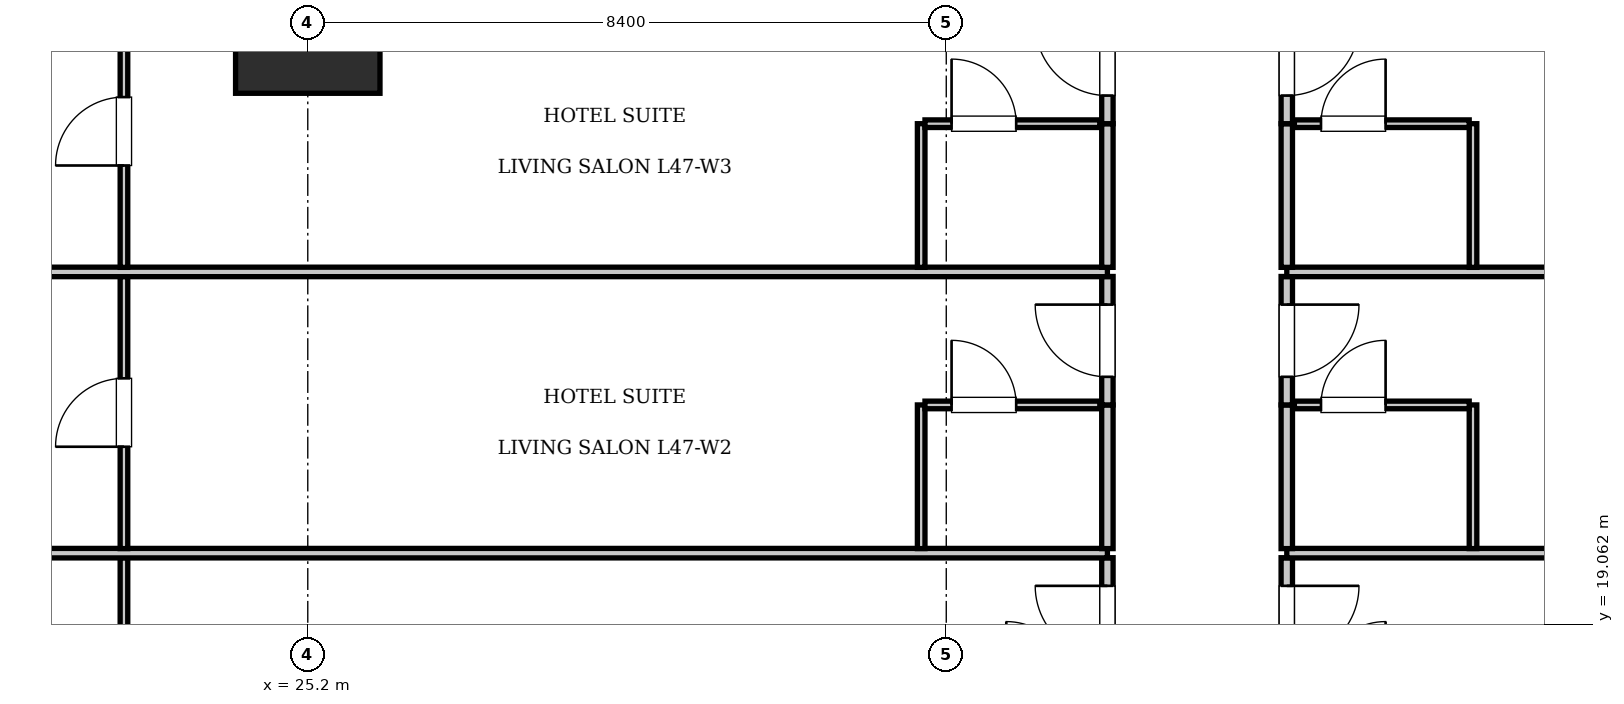
"""IFC4 building model, lengths in metres.
Left out: names, types, materials, properties, quantities, classifications, styles, units other than length and angle.
Written with IfcOpenShell. Run it as: python <this file> out.ifc"""

import sys

from ifc_helpers import new_model, si_unit, direction, frame, frame_2d, origin, origin_2d, place, context, subcontext, project, spatial, rectangle, extrude, element, fill, save


model = new_model("IFC4")
c1 = context("Model", 3, precision=1e-05, world=origin(), true_north=direction((0.0, 1.0)))
c2 = subcontext(c1, "Body", "Model", "MODEL_VIEW")
j1 = project(units=[si_unit("LENGTHUNIT", "METRE"), si_unit("PLANEANGLEUNIT", "RADIAN")], contexts=[c1])
p1 = place(None, origin())
s1 = spatial("IfcSite", under=j1, at=p1, CompositionType="ELEMENT")
p2 = place(p1, origin())
s2 = spatial("IfcBuilding", under=s1, at=p2, CompositionType="ELEMENT")
p3 = place(p2, frame((0.0, 0.0, 192.85)))
s3 = spatial("IfcBuildingStorey", under=s2, at=p3, CompositionType="ELEMENT", Elevation=192.85)
p4 = place(p3, frame((25.2, 27.0, 0.0), z_axis=(0.0, 0.0, 1.0), x_axis=(1.0, 0.0, 0.0)))
e1 = element("IfcColumn", 1, at=p4, inside=s3, PredefinedType="COLUMN", context=c2, shape_type="SweptSolid", body=[
    extrude(rectangle(XDim=1.9, YDim=1.9, at=origin_2d()), origin(), (0.0, 0.0, 1.0), 3.85),
])
p5 = place(p3, frame((35.72, 18.25, 0.0), z_axis=(0.0, 0.0, 1.0), x_axis=(0.0, 1.0, 0.0)))
e2 = element("IfcWall", 2, at=p5, inside=s3, PredefinedType="PARTITIONING", context=c2, shape_type="SweptSolid", body=[
    extrude(rectangle(XDim=1.69, YDim=0.15, at=frame_2d((0.845, 0.0))), origin(), (0.0, 0.0, 1.0), 3.61),
])
p6 = place(p5, frame((0.37, 0.0, 0.0)))
e3 = element("IfcOpeningElement", 3, at=p6, cuts=e2, PredefinedType="OPENING", context=c2, shape_type="SweptSolid", body=[
    extrude(rectangle(XDim=0.95, YDim=2.15, at=frame_2d((0.475, 1.075))), frame((0.0, 0.085, 0.0), z_axis=(0.0, -1.0, 0.0), x_axis=(1.0, 0.0, 0.0)), (0.0, 0.0, 1.0), 0.17),
])
p7 = place(p3, frame((22.781, 16.36, 0.0), z_axis=(0.0, 0.0, 1.0), x_axis=(0.0, 1.0, 0.0)))
e4 = element("IfcWall", 4, at=p7, inside=s3, PredefinedType="PARTITIONING", context=c2, shape_type="SweptSolid", body=[
    extrude(rectangle(XDim=3.58, YDim=0.1, at=frame_2d((1.79, 0.0))), origin(), (0.0, 0.0, 1.0), 3.61),
])
p8 = place(p7, frame((1.34, 0.0, 0.0)))
e5 = element("IfcOpeningElement", 5, at=p8, cuts=e4, PredefinedType="OPENING", context=c2, shape_type="SweptSolid", body=[
    extrude(rectangle(XDim=0.9, YDim=2.1, at=frame_2d((0.45, 1.05))), frame((0.0, 0.06, 0.0), z_axis=(0.0, -1.0, 0.0), x_axis=(1.0, 0.0, 0.0)), (0.0, 0.0, 1.0), 0.12),
])
p9 = place(p3, frame((38.08, 18.25, 0.0), z_axis=(0.0, 0.0, 1.0), x_axis=(0.0, 1.0, 0.0)))
e6 = element("IfcWall", 6, at=p9, inside=s3, PredefinedType="PARTITIONING", context=c2, shape_type="SweptSolid", body=[
    extrude(rectangle(XDim=1.69, YDim=0.15, at=frame_2d((0.845, 0.0))), origin(), (0.0, 0.0, 1.0), 3.61),
])
p10 = place(p9, frame((0.37, 0.0, 0.0)))
e7 = element("IfcOpeningElement", 7, at=p10, cuts=e6, PredefinedType="OPENING", context=c2, shape_type="SweptSolid", body=[
    extrude(rectangle(XDim=0.95, YDim=2.15, at=frame_2d((0.475, 1.075))), frame((0.0, 0.085, 0.0), z_axis=(0.0, -1.0, 0.0), x_axis=(1.0, 0.0, 0.0)), (0.0, 0.0, 1.0), 0.17),
])
p11 = place(p3, frame((13.2, 20.0, 0.0), z_axis=(0.0, 0.0, 1.0), x_axis=(1.0, 0.0, 0.0)))
e8 = element("IfcWall", 8, at=p11, inside=s3, PredefinedType="PARTITIONING", context=c2, shape_type="SweptSolid", body=[
    extrude(rectangle(XDim=22.52, YDim=0.125, at=frame_2d((11.26, 0.0))), origin(), (0.0, 0.0, 1.0), 3.61),
])
p12 = place(p3, frame((38.08, 20.0, 0.0), z_axis=(0.0, 0.0, 1.0), x_axis=(1.0, 0.0, 0.0)))
e9 = element("IfcWall", 9, at=p12, inside=s3, PredefinedType="PARTITIONING", context=c2, shape_type="SweptSolid", body=[
    extrude(rectangle(XDim=24.32, YDim=0.125, at=frame_2d((12.16, 0.0))), origin(), (0.0, 0.0, 1.0), 3.61),
])
p13 = place(p3, frame((35.72, 20.06, 0.0), z_axis=(0.0, 0.0, 1.0), x_axis=(0.0, 1.0, 0.0)))
e10 = element("IfcWall", 10, at=p13, inside=s3, PredefinedType="PARTITIONING", context=c2, shape_type="SweptSolid", body=[
    extrude(rectangle(XDim=1.89, YDim=0.15, at=frame_2d((0.945, 0.0))), origin(), (0.0, 0.0, 1.0), 3.61),
])
p14 = place(p3, frame((35.72, 21.95, 0.0), z_axis=(0.0, 0.0, 1.0), x_axis=(0.0, 1.0, 0.0)))
e11 = element("IfcWall", 11, at=p14, inside=s3, PredefinedType="PARTITIONING", context=c2, shape_type="SweptSolid", body=[
    extrude(rectangle(XDim=1.69, YDim=0.15, at=frame_2d((0.845, 0.0))), origin(), (0.0, 0.0, 1.0), 3.61),
])
p15 = place(p14, frame((0.37, 0.0, 0.0)))
e12 = element("IfcOpeningElement", 12, at=p15, cuts=e11, PredefinedType="OPENING", context=c2, shape_type="SweptSolid", body=[
    extrude(rectangle(XDim=0.95, YDim=2.15, at=frame_2d((0.475, 1.075))), frame((0.0, 0.085, 0.0), z_axis=(0.0, -1.0, 0.0), x_axis=(1.0, 0.0, 0.0)), (0.0, 0.0, 1.0), 0.17),
])
p16 = place(p3, frame((33.27, 20.06, 0.0), z_axis=(0.0, 0.0, 1.0), x_axis=(0.0, 1.0, 0.0)))
e13 = element("IfcWall", 13, at=p16, inside=s3, PredefinedType="PARTITIONING", context=c2, shape_type="SweptSolid", body=[
    extrude(rectangle(XDim=1.89, YDim=0.1, at=frame_2d((0.945, 0.0))), origin(), (0.0, 0.0, 1.0), 3.61),
])
p17 = place(p3, frame((33.32, 21.95, 0.0), z_axis=(0.0, 0.0, 1.0), x_axis=(1.0, 0.0, 0.0)))
e14 = element("IfcWall", 14, at=p17, inside=s3, PredefinedType="PARTITIONING", context=c2, shape_type="SweptSolid", body=[
    extrude(rectangle(XDim=2.3, YDim=0.1, at=frame_2d((1.15, 0.0))), origin(), (0.0, 0.0, 1.0), 3.61),
])
p18 = place(p17, frame((0.35, 0.0, 0.0)))
e15 = element("IfcOpeningElement", 15, at=p18, cuts=e14, PredefinedType="OPENING", context=c2, shape_type="SweptSolid", body=[
    extrude(rectangle(XDim=0.85, YDim=2.1, at=frame_2d((0.425, 1.05))), frame((0.0, 0.06, 0.0), z_axis=(0.0, -1.0, 0.0), x_axis=(1.0, 0.0, 0.0)), (0.0, 0.0, 1.0), 0.12),
])
p19 = place(p3, frame((22.781, 20.06, 0.0), z_axis=(0.0, 0.0, 1.0), x_axis=(0.0, 1.0, 0.0)))
e16 = element("IfcWall", 16, at=p19, inside=s3, PredefinedType="PARTITIONING", context=c2, shape_type="SweptSolid", body=[
    extrude(rectangle(XDim=3.58, YDim=0.1, at=frame_2d((1.79, 0.0))), origin(), (0.0, 0.0, 1.0), 3.61),
])
p20 = place(p19, frame((1.34, 0.0, 0.0)))
e17 = element("IfcOpeningElement", 17, at=p20, cuts=e16, PredefinedType="OPENING", context=c2, shape_type="SweptSolid", body=[
    extrude(rectangle(XDim=0.9, YDim=2.1, at=frame_2d((0.45, 1.05))), frame((0.0, 0.06, 0.0), z_axis=(0.0, -1.0, 0.0), x_axis=(1.0, 0.0, 0.0)), (0.0, 0.0, 1.0), 0.12),
])
p21 = place(p3, frame((38.08, 20.06, 0.0), z_axis=(0.0, 0.0, 1.0), x_axis=(0.0, 1.0, 0.0)))
e18 = element("IfcWall", 18, at=p21, inside=s3, PredefinedType="PARTITIONING", context=c2, shape_type="SweptSolid", body=[
    extrude(rectangle(XDim=1.89, YDim=0.15, at=frame_2d((0.945, 0.0))), origin(), (0.0, 0.0, 1.0), 3.61),
])
p22 = place(p3, frame((38.08, 21.95, 0.0), z_axis=(0.0, 0.0, 1.0), x_axis=(0.0, 1.0, 0.0)))
e19 = element("IfcWall", 19, at=p22, inside=s3, PredefinedType="PARTITIONING", context=c2, shape_type="SweptSolid", body=[
    extrude(rectangle(XDim=1.69, YDim=0.15, at=frame_2d((0.845, 0.0))), origin(), (0.0, 0.0, 1.0), 3.61),
])
p23 = place(p22, frame((0.37, 0.0, 0.0)))
e20 = element("IfcOpeningElement", 20, at=p23, cuts=e19, PredefinedType="OPENING", context=c2, shape_type="SweptSolid", body=[
    extrude(rectangle(XDim=0.95, YDim=2.15, at=frame_2d((0.475, 1.075))), frame((0.0, 0.085, 0.0), z_axis=(0.0, -1.0, 0.0), x_axis=(1.0, 0.0, 0.0)), (0.0, 0.0, 1.0), 0.17),
])
p24 = place(p3, frame((40.53, 20.06, 0.0), z_axis=(0.0, 0.0, 1.0), x_axis=(0.0, 1.0, 0.0)))
e21 = element("IfcWall", 21, at=p24, inside=s3, PredefinedType="PARTITIONING", context=c2, shape_type="SweptSolid", body=[
    extrude(rectangle(XDim=1.89, YDim=0.1, at=frame_2d((0.945, 0.0))), origin(), (0.0, 0.0, 1.0), 3.61),
])
p25 = place(p3, frame((38.18, 21.95, 0.0), z_axis=(0.0, 0.0, 1.0), x_axis=(1.0, 0.0, 0.0)))
e22 = element("IfcWall", 22, at=p25, inside=s3, PredefinedType="PARTITIONING", context=c2, shape_type="SweptSolid", body=[
    extrude(rectangle(XDim=2.3, YDim=0.1, at=frame_2d((1.15, 0.0))), origin(), (0.0, 0.0, 1.0), 3.61),
])
p26 = place(p25, frame((0.35, 0.0, 0.0)))
e23 = element("IfcOpeningElement", 23, at=p26, cuts=e22, PredefinedType="OPENING", context=c2, shape_type="SweptSolid", body=[
    extrude(rectangle(XDim=0.85, YDim=2.1, at=frame_2d((0.425, 1.05))), frame((0.0, 0.06, 0.0), z_axis=(0.0, -1.0, 0.0), x_axis=(1.0, 0.0, 0.0)), (0.0, 0.0, 1.0), 0.12),
])
p27 = place(p3, frame((13.2, 23.7, 0.0), z_axis=(0.0, 0.0, 1.0), x_axis=(1.0, 0.0, 0.0)))
e24 = element("IfcWall", 24, at=p27, inside=s3, PredefinedType="PARTITIONING", context=c2, shape_type="SweptSolid", body=[
    extrude(rectangle(XDim=22.52, YDim=0.125, at=frame_2d((11.26, 0.0))), origin(), (0.0, 0.0, 1.0), 3.61),
])
p28 = place(p3, frame((38.08, 23.7, 0.0), z_axis=(0.0, 0.0, 1.0), x_axis=(1.0, 0.0, 0.0)))
e25 = element("IfcWall", 25, at=p28, inside=s3, PredefinedType="PARTITIONING", context=c2, shape_type="SweptSolid", body=[
    extrude(rectangle(XDim=24.32, YDim=0.125, at=frame_2d((12.16, 0.0))), origin(), (0.0, 0.0, 1.0), 3.61),
])
p29 = place(p3, frame((35.72, 23.76, 0.0), z_axis=(0.0, 0.0, 1.0), x_axis=(0.0, 1.0, 0.0)))
e26 = element("IfcWall", 26, at=p29, inside=s3, PredefinedType="PARTITIONING", context=c2, shape_type="SweptSolid", body=[
    extrude(rectangle(XDim=1.89, YDim=0.15, at=frame_2d((0.945, 0.0))), origin(), (0.0, 0.0, 1.0), 3.61),
])
p30 = place(p3, frame((35.72, 25.65, 0.0), z_axis=(0.0, 0.0, 1.0), x_axis=(0.0, 1.0, 0.0)))
e27 = element("IfcWall", 27, at=p30, inside=s3, PredefinedType="PARTITIONING", context=c2, shape_type="SweptSolid", body=[
    extrude(rectangle(XDim=1.69, YDim=0.15, at=frame_2d((0.845, 0.0))), origin(), (0.0, 0.0, 1.0), 3.61),
])
p31 = place(p30, frame((0.37, 0.0, 0.0)))
e28 = element("IfcOpeningElement", 28, at=p31, cuts=e27, PredefinedType="OPENING", context=c2, shape_type="SweptSolid", body=[
    extrude(rectangle(XDim=0.95, YDim=2.15, at=frame_2d((0.475, 1.075))), frame((0.0, 0.085, 0.0), z_axis=(0.0, -1.0, 0.0), x_axis=(1.0, 0.0, 0.0)), (0.0, 0.0, 1.0), 0.17),
])
p32 = place(p3, frame((33.27, 23.76, 0.0), z_axis=(0.0, 0.0, 1.0), x_axis=(0.0, 1.0, 0.0)))
e29 = element("IfcWall", 29, at=p32, inside=s3, PredefinedType="PARTITIONING", context=c2, shape_type="SweptSolid", body=[
    extrude(rectangle(XDim=1.89, YDim=0.1, at=frame_2d((0.945, 0.0))), origin(), (0.0, 0.0, 1.0), 3.61),
])
p33 = place(p3, frame((33.32, 25.65, 0.0), z_axis=(0.0, 0.0, 1.0), x_axis=(1.0, 0.0, 0.0)))
e30 = element("IfcWall", 30, at=p33, inside=s3, PredefinedType="PARTITIONING", context=c2, shape_type="SweptSolid", body=[
    extrude(rectangle(XDim=2.3, YDim=0.1, at=frame_2d((1.15, 0.0))), origin(), (0.0, 0.0, 1.0), 3.61),
])
p34 = place(p33, frame((0.35, 0.0, 0.0)))
e31 = element("IfcOpeningElement", 31, at=p34, cuts=e30, PredefinedType="OPENING", context=c2, shape_type="SweptSolid", body=[
    extrude(rectangle(XDim=0.85, YDim=2.1, at=frame_2d((0.425, 1.05))), frame((0.0, 0.06, 0.0), z_axis=(0.0, -1.0, 0.0), x_axis=(1.0, 0.0, 0.0)), (0.0, 0.0, 1.0), 0.12),
])
p35 = place(p3, frame((22.781, 23.76, 0.0), z_axis=(0.0, 0.0, 1.0), x_axis=(0.0, 1.0, 0.0)))
e32 = element("IfcWall", 32, at=p35, inside=s3, PredefinedType="PARTITIONING", context=c2, shape_type="SweptSolid", body=[
    extrude(rectangle(XDim=3.58, YDim=0.1, at=frame_2d((1.79, 0.0))), origin(), (0.0, 0.0, 1.0), 3.61),
])
p36 = place(p35, frame((1.34, 0.0, 0.0)))
e33 = element("IfcOpeningElement", 33, at=p36, cuts=e32, PredefinedType="OPENING", context=c2, shape_type="SweptSolid", body=[
    extrude(rectangle(XDim=0.9, YDim=2.1, at=frame_2d((0.45, 1.05))), frame((0.0, 0.06, 0.0), z_axis=(0.0, -1.0, 0.0), x_axis=(1.0, 0.0, 0.0)), (0.0, 0.0, 1.0), 0.12),
])
p37 = place(p3, frame((38.08, 23.76, 0.0), z_axis=(0.0, 0.0, 1.0), x_axis=(0.0, 1.0, 0.0)))
e34 = element("IfcWall", 34, at=p37, inside=s3, PredefinedType="PARTITIONING", context=c2, shape_type="SweptSolid", body=[
    extrude(rectangle(XDim=1.89, YDim=0.15, at=frame_2d((0.945, 0.0))), origin(), (0.0, 0.0, 1.0), 3.61),
])
p38 = place(p3, frame((38.08, 25.65, 0.0), z_axis=(0.0, 0.0, 1.0), x_axis=(0.0, 1.0, 0.0)))
e35 = element("IfcWall", 35, at=p38, inside=s3, PredefinedType="PARTITIONING", context=c2, shape_type="SweptSolid", body=[
    extrude(rectangle(XDim=1.69, YDim=0.15, at=frame_2d((0.845, 0.0))), origin(), (0.0, 0.0, 1.0), 3.61),
])
p39 = place(p38, frame((0.37, 0.0, 0.0)))
e36 = element("IfcOpeningElement", 36, at=p39, cuts=e35, PredefinedType="OPENING", context=c2, shape_type="SweptSolid", body=[
    extrude(rectangle(XDim=0.95, YDim=2.15, at=frame_2d((0.475, 1.075))), frame((0.0, 0.085, 0.0), z_axis=(0.0, -1.0, 0.0), x_axis=(1.0, 0.0, 0.0)), (0.0, 0.0, 1.0), 0.17),
])
p40 = place(p3, frame((40.53, 23.76, 0.0), z_axis=(0.0, 0.0, 1.0), x_axis=(0.0, 1.0, 0.0)))
e37 = element("IfcWall", 37, at=p40, inside=s3, PredefinedType="PARTITIONING", context=c2, shape_type="SweptSolid", body=[
    extrude(rectangle(XDim=1.89, YDim=0.1, at=frame_2d((0.945, 0.0))), origin(), (0.0, 0.0, 1.0), 3.61),
])
p41 = place(p3, frame((38.18, 25.65, 0.0), z_axis=(0.0, 0.0, 1.0), x_axis=(1.0, 0.0, 0.0)))
e38 = element("IfcWall", 38, at=p41, inside=s3, PredefinedType="PARTITIONING", context=c2, shape_type="SweptSolid", body=[
    extrude(rectangle(XDim=2.3, YDim=0.1, at=frame_2d((1.15, 0.0))), origin(), (0.0, 0.0, 1.0), 3.61),
])
p42 = place(p41, frame((0.35, 0.0, 0.0)))
e39 = element("IfcOpeningElement", 39, at=p42, cuts=e38, PredefinedType="OPENING", context=c2, shape_type="SweptSolid", body=[
    extrude(rectangle(XDim=0.85, YDim=2.1, at=frame_2d((0.425, 1.05))), frame((0.0, 0.06, 0.0), z_axis=(0.0, -1.0, 0.0), x_axis=(1.0, 0.0, 0.0)), (0.0, 0.0, 1.0), 0.12),
])
p43 = place(p6, origin())
e40 = element("IfcDoor", 40, at=p43, inside=s3, OperationType="SINGLE_SWING_RIGHT", PredefinedType="DOOR", context=c2, shape_type="SweptSolid", body=[
    extrude(rectangle(XDim=0.95, YDim=2.15, at=frame_2d((0.475, 1.075))), frame((0.0, 0.025, 0.0), z_axis=(0.0, -1.0, 0.0), x_axis=(1.0, 0.0, 0.0)), (0.0, 0.0, 1.0), 0.05),
])
fill(e3, e40)
p44 = place(p10, frame((0.95, 0.0, 0.0), z_axis=(0.0, 0.0, 1.0), x_axis=(-1.0, 0.0, 0.0)))
e41 = element("IfcDoor", 41, at=p44, inside=s3, OperationType="SINGLE_SWING_LEFT", PredefinedType="DOOR", context=c2, shape_type="SweptSolid", body=[
    extrude(rectangle(XDim=0.95, YDim=2.15, at=frame_2d((0.475, 1.075))), frame((0.0, 0.025, 0.0), z_axis=(0.0, -1.0, 0.0), x_axis=(1.0, 0.0, 0.0)), (0.0, 0.0, 1.0), 0.05),
])
fill(e7, e41)
p45 = place(p18, origin())
e42 = element("IfcDoor", 42, at=p45, inside=s3, OperationType="SINGLE_SWING_LEFT", PredefinedType="DOOR", context=c2, shape_type="SweptSolid", body=[
    extrude(rectangle(XDim=0.85, YDim=2.1, at=frame_2d((0.425, 1.05))), frame((0.0, 0.025, 0.0), z_axis=(0.0, -1.0, 0.0), x_axis=(1.0, 0.0, 0.0)), (0.0, 0.0, 1.0), 0.05),
])
fill(e15, e42)
p46 = place(p15, origin())
e43 = element("IfcDoor", 43, at=p46, inside=s3, OperationType="SINGLE_SWING_RIGHT", PredefinedType="DOOR", context=c2, shape_type="SweptSolid", body=[
    extrude(rectangle(XDim=0.95, YDim=2.15, at=frame_2d((0.475, 1.075))), frame((0.0, 0.025, 0.0), z_axis=(0.0, -1.0, 0.0), x_axis=(1.0, 0.0, 0.0)), (0.0, 0.0, 1.0), 0.05),
])
fill(e12, e43)
p47 = place(p20, origin())
e44 = element("IfcDoor", 44, at=p47, inside=s3, OperationType="SINGLE_SWING_LEFT", PredefinedType="DOOR", context=c2, shape_type="SweptSolid", body=[
    extrude(rectangle(XDim=0.9, YDim=2.1, at=frame_2d((0.45, 1.05))), frame((0.0, 0.025, 0.0), z_axis=(0.0, -1.0, 0.0), x_axis=(1.0, 0.0, 0.0)), (0.0, 0.0, 1.0), 0.05),
])
fill(e17, e44)
p48 = place(p26, origin())
e45 = element("IfcDoor", 45, at=p48, inside=s3, OperationType="SINGLE_SWING_RIGHT", PredefinedType="DOOR", context=c2, shape_type="SweptSolid", body=[
    extrude(rectangle(XDim=0.85, YDim=2.1, at=frame_2d((0.425, 1.05))), frame((0.0, 0.025, 0.0), z_axis=(0.0, -1.0, 0.0), x_axis=(1.0, 0.0, 0.0)), (0.0, 0.0, 1.0), 0.05),
])
fill(e23, e45)
p49 = place(p23, frame((0.95, 0.0, 0.0), z_axis=(0.0, 0.0, 1.0), x_axis=(-1.0, 0.0, 0.0)))
e46 = element("IfcDoor", 46, at=p49, inside=s3, OperationType="SINGLE_SWING_LEFT", PredefinedType="DOOR", context=c2, shape_type="SweptSolid", body=[
    extrude(rectangle(XDim=0.95, YDim=2.15, at=frame_2d((0.475, 1.075))), frame((0.0, 0.025, 0.0), z_axis=(0.0, -1.0, 0.0), x_axis=(1.0, 0.0, 0.0)), (0.0, 0.0, 1.0), 0.05),
])
fill(e20, e46)
p50 = place(p34, origin())
e47 = element("IfcDoor", 47, at=p50, inside=s3, OperationType="SINGLE_SWING_LEFT", PredefinedType="DOOR", context=c2, shape_type="SweptSolid", body=[
    extrude(rectangle(XDim=0.85, YDim=2.1, at=frame_2d((0.425, 1.05))), frame((0.0, 0.025, 0.0), z_axis=(0.0, -1.0, 0.0), x_axis=(1.0, 0.0, 0.0)), (0.0, 0.0, 1.0), 0.05),
])
fill(e31, e47)
p51 = place(p31, origin())
e48 = element("IfcDoor", 48, at=p51, inside=s3, OperationType="SINGLE_SWING_RIGHT", PredefinedType="DOOR", context=c2, shape_type="SweptSolid", body=[
    extrude(rectangle(XDim=0.95, YDim=2.15, at=frame_2d((0.475, 1.075))), frame((0.0, 0.025, 0.0), z_axis=(0.0, -1.0, 0.0), x_axis=(1.0, 0.0, 0.0)), (0.0, 0.0, 1.0), 0.05),
])
fill(e28, e48)
p52 = place(p36, origin())
e49 = element("IfcDoor", 49, at=p52, inside=s3, OperationType="SINGLE_SWING_LEFT", PredefinedType="DOOR", context=c2, shape_type="SweptSolid", body=[
    extrude(rectangle(XDim=0.9, YDim=2.1, at=frame_2d((0.45, 1.05))), frame((0.0, 0.025, 0.0), z_axis=(0.0, -1.0, 0.0), x_axis=(1.0, 0.0, 0.0)), (0.0, 0.0, 1.0), 0.05),
])
fill(e33, e49)
p53 = place(p42, origin())
e50 = element("IfcDoor", 50, at=p53, inside=s3, OperationType="SINGLE_SWING_RIGHT", PredefinedType="DOOR", context=c2, shape_type="SweptSolid", body=[
    extrude(rectangle(XDim=0.85, YDim=2.1, at=frame_2d((0.425, 1.05))), frame((0.0, 0.025, 0.0), z_axis=(0.0, -1.0, 0.0), x_axis=(1.0, 0.0, 0.0)), (0.0, 0.0, 1.0), 0.05),
])
fill(e39, e50)
p54 = place(p39, frame((0.95, 0.0, 0.0), z_axis=(0.0, 0.0, 1.0), x_axis=(-1.0, 0.0, 0.0)))
e51 = element("IfcDoor", 51, at=p54, inside=s3, OperationType="SINGLE_SWING_LEFT", PredefinedType="DOOR", context=c2, shape_type="SweptSolid", body=[
    extrude(rectangle(XDim=0.95, YDim=2.15, at=frame_2d((0.475, 1.075))), frame((0.0, 0.025, 0.0), z_axis=(0.0, -1.0, 0.0), x_axis=(1.0, 0.0, 0.0)), (0.0, 0.0, 1.0), 0.05),
])
fill(e36, e51)
save(model, sys.argv[1])
